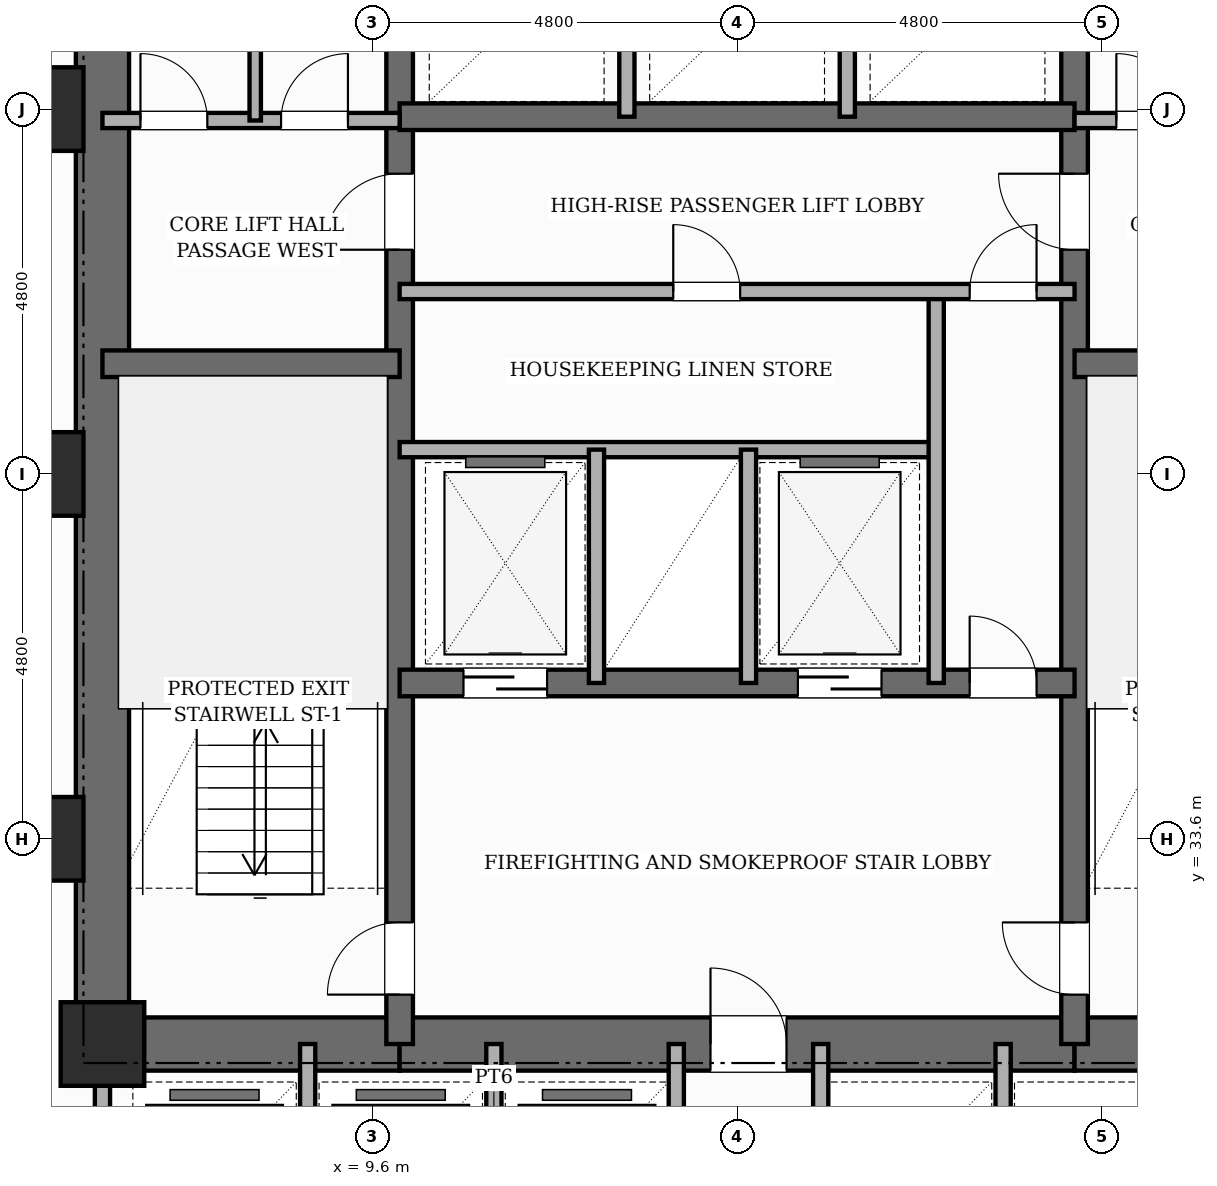
"""IFC4 building model, lengths in metres.
Left out: names, types, materials, properties, quantities, classifications, styles, units other than length and angle.
Written with IfcOpenShell. Run it as: python <this file> out.ifc"""

import sys

from ifc_helpers import new_model, si_unit, direction, frame, frame_2d, origin, origin_2d, place, context, subcontext, project, spatial, rectangle, extrude, element, fill, save


model = new_model("IFC4")
c1 = context("Model", 3, precision=1e-05, world=origin(), true_north=direction((0.0, 1.0)))
c2 = subcontext(c1, "Body", "Model", "MODEL_VIEW")
j1 = project(units=[si_unit("LENGTHUNIT", "METRE"), si_unit("PLANEANGLEUNIT", "RADIAN")], contexts=[c1])
p1 = place(None, origin())
s1 = spatial("IfcSite", under=j1, at=p1, CompositionType="ELEMENT")
p2 = place(p1, origin())
s2 = spatial("IfcBuilding", under=s1, at=p2, CompositionType="ELEMENT")
p3 = place(p2, frame((0.0, 0.0, 46.6)))
s3 = spatial("IfcBuildingStorey", under=s2, at=p3, CompositionType="ELEMENT", Elevation=46.6)
p4 = place(p3, frame((6.05, 30.55, 0.0), z_axis=(0.0, 0.0, 1.0), x_axis=(0.0, 1.0, 0.0)))
e1 = element("IfcWall", 1, at=p4, inside=s3, PredefinedType="SHEAR", context=c2, shape_type="SweptSolid", body=[
    extrude(rectangle(XDim=15.6, YDim=0.7, at=frame_2d((7.8, 0.0))), origin(), (0.0, 0.0, 1.0), 3.6),
])
p5 = place(p3, frame((6.05, 30.9, 0.0), z_axis=(0.0, 0.0, 1.0), x_axis=(1.0, 0.0, 0.0)))
e2 = element("IfcWall", 2, at=p5, inside=s3, PredefinedType="SHEAR", context=c2, shape_type="SweptSolid", body=[
    extrude(rectangle(XDim=3.91, YDim=0.7, at=frame_2d((1.955, 0.0))), origin(), (0.0, 0.0, 1.0), 3.6),
])
p6 = place(p3, frame((9.96, 30.9, 0.0), z_axis=(0.0, 0.0, 1.0), x_axis=(1.0, 0.0, 0.0)))
e3 = element("IfcWall", 3, at=p6, inside=s3, PredefinedType="SHEAR", context=c2, shape_type="SweptSolid", body=[
    extrude(rectangle(XDim=8.88, YDim=0.7, at=frame_2d((4.44, 0.0))), origin(), (0.0, 0.0, 1.0), 3.6),
])
p7 = place(p6, frame((4.09, 0.0, 0.0)))
e4 = element("IfcOpeningElement", 4, at=p7, cuts=e3, PredefinedType="OPENING", context=c2, shape_type="SweptSolid", body=[
    extrude(rectangle(XDim=1.0, YDim=2.15, at=frame_2d((0.5, 1.075))), frame((0.0, 0.36, 0.0), z_axis=(0.0, -1.0, 0.0), x_axis=(1.0, 0.0, 0.0)), (0.0, 0.0, 1.0), 0.72),
])
p8 = place(p3, frame((18.84, 30.9, 0.0), z_axis=(0.0, 0.0, 1.0), x_axis=(1.0, 0.0, 0.0)))
e5 = element("IfcWall", 5, at=p8, inside=s3, PredefinedType="SHEAR", context=c2, shape_type="SweptSolid", body=[
    extrude(rectangle(XDim=3.91, YDim=0.7, at=frame_2d((1.955, 0.0))), origin(), (0.0, 0.0, 1.0), 3.6),
])
p9 = place(p3, frame((9.96, 30.9, 0.0), z_axis=(0.0, 0.0, 1.0), x_axis=(0.0, 1.0, 0.0)))
e6 = element("IfcWall", 6, at=p9, inside=s3, PredefinedType="SHEAR", context=c2, shape_type="SweptSolid", body=[
    extrude(rectangle(XDim=14.9, YDim=0.35, at=frame_2d((7.45, 0.0))), origin(), (0.0, 0.0, 1.0), 3.6),
])
p10 = place(p9, frame((0.65, 0.0, 0.0)))
e7 = element("IfcOpeningElement", 7, at=p10, cuts=e6, PredefinedType="OPENING", context=c2, shape_type="SweptSolid", body=[
    extrude(rectangle(XDim=0.95, YDim=2.1, at=frame_2d((0.475, 1.05))), frame((0.0, 0.185, 0.0), z_axis=(0.0, -1.0, 0.0), x_axis=(1.0, 0.0, 0.0)), (0.0, 0.0, 1.0), 0.37),
])
p11 = place(p9, frame((10.45, 0.0, 0.0)))
e8 = element("IfcOpeningElement", 8, at=p11, cuts=e6, PredefinedType="OPENING", context=c2, shape_type="SweptSolid", body=[
    extrude(rectangle(XDim=1.0, YDim=2.15, at=frame_2d((0.5, 1.075))), frame((0.0, 0.185, 0.0), z_axis=(0.0, -1.0, 0.0), x_axis=(1.0, 0.0, 0.0)), (0.0, 0.0, 1.0), 0.37),
])
p12 = place(p3, frame((18.84, 30.9, 0.0), z_axis=(0.0, 0.0, 1.0), x_axis=(0.0, 1.0, 0.0)))
e9 = element("IfcWall", 9, at=p12, inside=s3, PredefinedType="SHEAR", context=c2, shape_type="SweptSolid", body=[
    extrude(rectangle(XDim=14.9, YDim=0.35, at=frame_2d((7.45, 0.0))), origin(), (0.0, 0.0, 1.0), 3.6),
])
p13 = place(p12, frame((0.65, 0.0, 0.0)))
e10 = element("IfcOpeningElement", 10, at=p13, cuts=e9, PredefinedType="OPENING", context=c2, shape_type="SweptSolid", body=[
    extrude(rectangle(XDim=0.95, YDim=2.1, at=frame_2d((0.475, 1.05))), frame((0.0, 0.185, 0.0), z_axis=(0.0, -1.0, 0.0), x_axis=(1.0, 0.0, 0.0)), (0.0, 0.0, 1.0), 0.37),
])
p14 = place(p12, frame((10.45, 0.0, 0.0)))
e11 = element("IfcOpeningElement", 11, at=p14, cuts=e9, PredefinedType="OPENING", context=c2, shape_type="SweptSolid", body=[
    extrude(rectangle(XDim=1.0, YDim=2.15, at=frame_2d((0.5, 1.075))), frame((0.0, 0.185, 0.0), z_axis=(0.0, -1.0, 0.0), x_axis=(1.0, 0.0, 0.0)), (0.0, 0.0, 1.0), 0.37),
])
for number, where, z_axis, x_axis in (
    (12, (6.05, 39.85, 0.0), (0.0, 0.0, 1.0), (1.0, 0.0, 0.0)),
    (13, (18.84, 39.85, 0.0), (0.0, 0.0, 1.0), (1.0, 0.0, 0.0)),
):
    element("IfcWall", number, at=place(p3, frame(where, z_axis=z_axis, x_axis=x_axis)), inside=s3, PredefinedType="SHEAR", context=c2, shape_type="SweptSolid", body=[
        extrude(rectangle(XDim=3.91, YDim=0.35, at=frame_2d((1.955, 0.0))), origin(), (0.0, 0.0, 1.0), 3.6),
    ])
p15 = place(p3, frame((9.96, 35.65, 0.0), z_axis=(0.0, 0.0, 1.0), x_axis=(1.0, 0.0, 0.0)))
e14 = element("IfcWall", 14, at=p15, inside=s3, PredefinedType="SHEAR", context=c2, shape_type="SweptSolid", body=[
    extrude(rectangle(XDim=8.88, YDim=0.35, at=frame_2d((4.44, 0.0))), origin(), (0.0, 0.0, 1.0), 3.6),
])
p16 = place(p15, frame((0.84, 0.0, 0.0)))
e15 = element("IfcOpeningElement", 15, at=p16, cuts=e14, PredefinedType="OPENING", context=c2, shape_type="SweptSolid", body=[
    extrude(rectangle(XDim=1.1, YDim=2.15, at=frame_2d((0.55, 1.075))), frame((0.0, 0.185, 0.0), z_axis=(0.0, -1.0, 0.0), x_axis=(1.0, 0.0, 0.0)), (0.0, 0.0, 1.0), 0.37),
])
p17 = place(p15, frame((5.24, 0.0, 0.0)))
e16 = element("IfcOpeningElement", 16, at=p17, cuts=e14, PredefinedType="OPENING", context=c2, shape_type="SweptSolid", body=[
    extrude(rectangle(XDim=1.1, YDim=2.15, at=frame_2d((0.55, 1.075))), frame((0.0, 0.185, 0.0), z_axis=(0.0, -1.0, 0.0), x_axis=(1.0, 0.0, 0.0)), (0.0, 0.0, 1.0), 0.37),
])
p18 = place(p15, frame((7.5, 0.0, 0.0)))
e17 = element("IfcOpeningElement", 17, at=p18, cuts=e14, PredefinedType="OPENING", context=c2, shape_type="SweptSolid", body=[
    extrude(rectangle(XDim=0.88, YDim=2.1, at=frame_2d((0.44, 1.05))), frame((0.0, 0.185, 0.0), z_axis=(0.0, -1.0, 0.0), x_axis=(1.0, 0.0, 0.0)), (0.0, 0.0, 1.0), 0.37),
])
p19 = place(p3, frame((9.96, 43.1, 0.0), z_axis=(0.0, 0.0, 1.0), x_axis=(1.0, 0.0, 0.0)))
e18 = element("IfcWall", 18, at=p19, inside=s3, PredefinedType="SHEAR", context=c2, shape_type="SweptSolid", body=[
    extrude(rectangle(XDim=8.88, YDim=0.35, at=frame_2d((4.44, 0.0))), origin(), (0.0, 0.0, 1.0), 3.6),
])
for number, where, z_axis, x_axis in (
    (19, (5.25, 33.6, 0.0), (0.0, 0.0, 1.0), (1.0, 0.0, 0.0)),
    (20, (5.25, 38.4, 0.0), (0.0, 0.0, 1.0), (1.0, 0.0, 0.0)),
    (21, (5.25, 43.2, 0.0), (0.0, 0.0, 1.0), (1.0, 0.0, 0.0)),
    (22, (6.05, 30.9, 0.0), (0.0, 0.0, 1.0), (1.0, 0.0, 0.0)),
):
    element("IfcColumn", number, at=place(p3, frame(where, z_axis=z_axis, x_axis=x_axis)), inside=s3, PredefinedType="COLUMN", context=c2, shape_type="SweptSolid", body=[
        extrude(rectangle(XDim=1.1, YDim=1.1, at=origin_2d()), origin(), (0.0, 0.0, 1.0), 3.6),
    ])
p20 = place(p3, frame((9.96, 38.72, 0.0), z_axis=(0.0, 0.0, 1.0), x_axis=(1.0, 0.0, 0.0)))
e23 = element("IfcWall", 23, at=p20, inside=s3, PredefinedType="POLYGONAL", context=c2, shape_type="SweptSolid", body=[
    extrude(rectangle(XDim=7.06, YDim=0.2, at=frame_2d((3.53, 0.0))), origin(), (0.0, 0.0, 1.0), 3.35),
])
for number, where, z_axis, x_axis in (
    (24, (12.55, 35.65, 0.0), (0.0, 0.0, 1.0), (0.0, 1.0, 0.0)),
    (25, (14.55, 35.65, 0.0), (0.0, 0.0, 1.0), (0.0, 1.0, 0.0)),
):
    element("IfcWall", number, at=place(p3, frame(where, z_axis=z_axis, x_axis=x_axis)), inside=s3, PredefinedType="POLYGONAL", context=c2, shape_type="SweptSolid", body=[
        extrude(rectangle(XDim=3.07, YDim=0.2, at=frame_2d((1.535, 0.0))), origin(), (0.0, 0.0, 1.0), 3.35),
    ])
p21 = place(p3, frame((17.02, 35.65, 0.0), z_axis=(0.0, 0.0, 1.0), x_axis=(0.0, 1.0, 0.0)))
e26 = element("IfcWall", 26, at=p21, inside=s3, PredefinedType="POLYGONAL", context=c2, shape_type="SweptSolid", body=[
    extrude(rectangle(XDim=5.15, YDim=0.2, at=frame_2d((2.575, 0.0))), origin(), (0.0, 0.0, 1.0), 3.35),
])
p22 = place(p3, frame((9.96, 40.8, 0.0), z_axis=(0.0, 0.0, 1.0), x_axis=(1.0, 0.0, 0.0)))
e27 = element("IfcWall", 27, at=p22, inside=s3, PredefinedType="POLYGONAL", context=c2, shape_type="SweptSolid", body=[
    extrude(rectangle(XDim=8.88, YDim=0.2, at=frame_2d((4.44, 0.0))), origin(), (0.0, 0.0, 1.0), 3.35),
])
p23 = place(p22, frame((7.5, 0.0, 0.0)))
e28 = element("IfcOpeningElement", 28, at=p23, cuts=e27, PredefinedType="OPENING", context=c2, shape_type="SweptSolid", body=[
    extrude(rectangle(XDim=0.88, YDim=2.1, at=frame_2d((0.44, 1.05))), frame((0.0, 0.11, 0.0), z_axis=(0.0, -1.0, 0.0), x_axis=(1.0, 0.0, 0.0)), (0.0, 0.0, 1.0), 0.22),
])
p24 = place(p22, frame((3.6, 0.0, 0.0)))
e29 = element("IfcOpeningElement", 29, at=p24, cuts=e27, PredefinedType="OPENING", context=c2, shape_type="SweptSolid", body=[
    extrude(rectangle(XDim=0.88, YDim=2.1, at=frame_2d((0.44, 1.05))), frame((0.0, 0.11, 0.0), z_axis=(0.0, -1.0, 0.0), x_axis=(1.0, 0.0, 0.0)), (0.0, 0.0, 1.0), 0.22),
])
p25 = place(p3, frame((18.84, 43.05, 0.0), z_axis=(0.0, 0.0, 1.0), x_axis=(1.0, 0.0, 0.0)))
e30 = element("IfcWall", 30, at=p25, inside=s3, PredefinedType="POLYGONAL", context=c2, shape_type="SweptSolid", body=[
    extrude(rectangle(XDim=3.91, YDim=0.2, at=frame_2d((1.955, 0.0))), origin(), (0.0, 0.0, 1.0), 2.53),
])
p26 = place(p25, frame((0.55, 0.0, 0.0)))
e31 = element("IfcOpeningElement", 31, at=p26, cuts=e30, PredefinedType="OPENING", context=c2, shape_type="SweptSolid", body=[
    extrude(rectangle(XDim=0.88, YDim=2.1, at=frame_2d((0.44, 1.05))), frame((0.0, 0.11, 0.0), z_axis=(0.0, -1.0, 0.0), x_axis=(1.0, 0.0, 0.0)), (0.0, 0.0, 1.0), 0.22),
])
p27 = place(p25, frame((2.25, 0.0, 0.0)))
e32 = element("IfcOpeningElement", 32, at=p27, cuts=e30, PredefinedType="OPENING", context=c2, shape_type="SweptSolid", body=[
    extrude(rectangle(XDim=0.86, YDim=2.1, at=frame_2d((0.43, 1.05))), frame((0.0, 0.11, 0.0), z_axis=(0.0, -1.0, 0.0), x_axis=(1.0, 0.0, 0.0)), (0.0, 0.0, 1.0), 0.22),
])
p28 = place(p3, frame((6.05, 43.05, 0.0), z_axis=(0.0, 0.0, 1.0), x_axis=(1.0, 0.0, 0.0)))
e33 = element("IfcWall", 33, at=p28, inside=s3, PredefinedType="POLYGONAL", context=c2, shape_type="SweptSolid", body=[
    extrude(rectangle(XDim=3.91, YDim=0.2, at=frame_2d((1.955, 0.0))), origin(), (0.0, 0.0, 1.0), 2.53),
])
p29 = place(p28, frame((0.5, 0.0, 0.0)))
e34 = element("IfcOpeningElement", 34, at=p29, cuts=e33, PredefinedType="OPENING", context=c2, shape_type="SweptSolid", body=[
    extrude(rectangle(XDim=0.88, YDim=2.1, at=frame_2d((0.44, 1.05))), frame((0.0, 0.11, 0.0), z_axis=(0.0, -1.0, 0.0), x_axis=(1.0, 0.0, 0.0)), (0.0, 0.0, 1.0), 0.22),
])
p30 = place(p28, frame((2.35, 0.0, 0.0)))
e35 = element("IfcOpeningElement", 35, at=p30, cuts=e33, PredefinedType="OPENING", context=c2, shape_type="SweptSolid", body=[
    extrude(rectangle(XDim=0.88, YDim=2.1, at=frame_2d((0.44, 1.05))), frame((0.0, 0.11, 0.0), z_axis=(0.0, -1.0, 0.0), x_axis=(1.0, 0.0, 0.0)), (0.0, 0.0, 1.0), 0.22),
])
for number, where, z_axis, x_axis in (
    (36, (12.95, 43.1, 0.0), (0.0, 0.0, 1.0), (0.0, 1.0, 0.0)),
    (37, (15.85, 43.1, 0.0), (0.0, 0.0, 1.0), (0.0, 1.0, 0.0)),
):
    element("IfcWall", number, at=place(p3, frame(where, z_axis=z_axis, x_axis=x_axis)), inside=s3, PredefinedType="POLYGONAL", context=c2, shape_type="SweptSolid", body=[
        extrude(rectangle(XDim=2.55, YDim=0.2, at=frame_2d((1.275, 0.0))), origin(), (0.0, 0.0, 1.0), 3.35),
    ])
p31 = place(p3, frame((8.06, 43.05, 0.0), z_axis=(0.0, 0.0, 1.0), x_axis=(0.0, 1.0, 0.0)))
e38 = element("IfcWall", 38, at=p31, inside=s3, PredefinedType="PARTITIONING", context=c2, shape_type="SweptSolid", body=[
    extrude(rectangle(XDim=2.6, YDim=0.15, at=frame_2d((1.3, 0.0))), origin(), (0.0, 0.0, 1.0), 3.35),
])
p32 = place(p3, frame((6.05, 27.9, 0.0), z_axis=(0.0, 0.0, 1.0), x_axis=(0.0, 1.0, 0.0)))
e39 = element("IfcWall", 39, at=p32, inside=s3, PredefinedType="POLYGONAL", context=c2, shape_type="SweptSolid", body=[
    extrude(rectangle(XDim=3.0, YDim=0.2, at=frame_2d((1.5, 0.0))), origin(), (0.0, 0.0, 1.0), 3.35),
])
for number, where, z_axis, x_axis in (
    (40, (13.6, 28.0, 0.0), (0.0, 0.0, 1.0), (0.0, 1.0, 0.0)),
    (41, (15.5, 28.0, 0.0), (0.0, 0.0, 1.0), (0.0, 1.0, 0.0)),
    (42, (8.75, 28.0, 0.0), (0.0, 0.0, 1.0), (0.0, 1.0, 0.0)),
    (43, (11.2, 28.0, 0.0), (0.0, 0.0, 1.0), (0.0, 1.0, 0.0)),
    (44, (17.9, 28.0, 0.0), (0.0, 0.0, 1.0), (0.0, 1.0, 0.0)),
):
    element("IfcWall", number, at=place(p3, frame(where, z_axis=z_axis, x_axis=x_axis)), inside=s3, PredefinedType="POLYGONAL", context=c2, shape_type="SweptSolid", body=[
        extrude(rectangle(XDim=2.9, YDim=0.2, at=frame_2d((1.45, 0.0))), origin(), (0.0, 0.0, 1.0), 3.35),
    ])
p33 = place(p10, origin())
e45 = element("IfcDoor", 45, at=p33, inside=s3, OperationType="SINGLE_SWING_LEFT", PredefinedType="DOOR", context=c2, shape_type="SweptSolid", body=[
    extrude(rectangle(XDim=0.95, YDim=2.1, at=frame_2d((0.475, 1.05))), frame((0.0, 0.025, 0.0), z_axis=(0.0, -1.0, 0.0), x_axis=(1.0, 0.0, 0.0)), (0.0, 0.0, 1.0), 0.05),
])
fill(e7, e45)
p34 = place(p13, origin())
e46 = element("IfcDoor", 46, at=p34, inside=s3, OperationType="SINGLE_SWING_RIGHT", PredefinedType="DOOR", context=c2, shape_type="SweptSolid", body=[
    extrude(rectangle(XDim=0.95, YDim=2.1, at=frame_2d((0.475, 1.05))), frame((0.0, 0.025, 0.0), z_axis=(0.0, -1.0, 0.0), x_axis=(1.0, 0.0, 0.0)), (0.0, 0.0, 1.0), 0.05),
])
fill(e10, e46)
p35 = place(p7, origin())
e47 = element("IfcDoor", 47, at=p35, inside=s3, OperationType="SINGLE_SWING_LEFT", PredefinedType="DOOR", context=c2, shape_type="SweptSolid", body=[
    extrude(rectangle(XDim=1.0, YDim=2.15, at=frame_2d((0.5, 1.075))), frame((0.0, 0.025, 0.0), z_axis=(0.0, -1.0, 0.0), x_axis=(1.0, 0.0, 0.0)), (0.0, 0.0, 1.0), 0.05),
])
fill(e4, e47)
p36 = place(p16, origin())
e48 = element("IfcDoor", 48, at=p36, inside=s3, OperationType="SLIDING_TO_LEFT", PredefinedType="DOOR", context=c2, shape_type="SweptSolid", body=[
    extrude(rectangle(XDim=1.1, YDim=2.15, at=frame_2d((0.55, 1.075))), frame((0.0, 0.025, 0.0), z_axis=(0.0, -1.0, 0.0), x_axis=(1.0, 0.0, 0.0)), (0.0, 0.0, 1.0), 0.05),
])
fill(e15, e48)
p37 = place(p17, origin())
e49 = element("IfcDoor", 49, at=p37, inside=s3, OperationType="SLIDING_TO_RIGHT", PredefinedType="DOOR", context=c2, shape_type="SweptSolid", body=[
    extrude(rectangle(XDim=1.1, YDim=2.15, at=frame_2d((0.55, 1.075))), frame((0.0, 0.025, 0.0), z_axis=(0.0, -1.0, 0.0), x_axis=(1.0, 0.0, 0.0)), (0.0, 0.0, 1.0), 0.05),
])
fill(e16, e49)
p38 = place(p18, origin())
e50 = element("IfcDoor", 50, at=p38, inside=s3, OperationType="SINGLE_SWING_LEFT", PredefinedType="DOOR", context=c2, shape_type="SweptSolid", body=[
    extrude(rectangle(XDim=0.88, YDim=2.1, at=frame_2d((0.44, 1.05))), frame((0.0, 0.025, 0.0), z_axis=(0.0, -1.0, 0.0), x_axis=(1.0, 0.0, 0.0)), (0.0, 0.0, 1.0), 0.05),
])
fill(e17, e50)
p39 = place(p23, origin())
e51 = element("IfcDoor", 51, at=p39, inside=s3, OperationType="SINGLE_SWING_RIGHT", PredefinedType="DOOR", context=c2, shape_type="SweptSolid", body=[
    extrude(rectangle(XDim=0.88, YDim=2.1, at=frame_2d((0.44, 1.05))), frame((0.0, 0.025, 0.0), z_axis=(0.0, -1.0, 0.0), x_axis=(1.0, 0.0, 0.0)), (0.0, 0.0, 1.0), 0.05),
])
fill(e28, e51)
p40 = place(p11, origin())
e52 = element("IfcDoor", 52, at=p40, inside=s3, OperationType="SINGLE_SWING_LEFT", PredefinedType="DOOR", context=c2, shape_type="SweptSolid", body=[
    extrude(rectangle(XDim=1.0, YDim=2.15, at=frame_2d((0.5, 1.075))), frame((0.0, 0.025, 0.0), z_axis=(0.0, -1.0, 0.0), x_axis=(1.0, 0.0, 0.0)), (0.0, 0.0, 1.0), 0.05),
])
fill(e8, e52)
p41 = place(p14, origin())
e53 = element("IfcDoor", 53, at=p41, inside=s3, OperationType="SINGLE_SWING_RIGHT", PredefinedType="DOOR", context=c2, shape_type="SweptSolid", body=[
    extrude(rectangle(XDim=1.0, YDim=2.15, at=frame_2d((0.5, 1.075))), frame((0.0, 0.025, 0.0), z_axis=(0.0, -1.0, 0.0), x_axis=(1.0, 0.0, 0.0)), (0.0, 0.0, 1.0), 0.05),
])
fill(e11, e53)
p42 = place(p29, origin())
e54 = element("IfcDoor", 54, at=p42, inside=s3, OperationType="SINGLE_SWING_LEFT", PredefinedType="DOOR", context=c2, shape_type="SweptSolid", body=[
    extrude(rectangle(XDim=0.88, YDim=2.1, at=frame_2d((0.44, 1.05))), frame((0.0, 0.025, 0.0), z_axis=(0.0, -1.0, 0.0), x_axis=(1.0, 0.0, 0.0)), (0.0, 0.0, 1.0), 0.05),
])
fill(e34, e54)
p43 = place(p30, origin())
e55 = element("IfcDoor", 55, at=p43, inside=s3, OperationType="SINGLE_SWING_RIGHT", PredefinedType="DOOR", context=c2, shape_type="SweptSolid", body=[
    extrude(rectangle(XDim=0.88, YDim=2.1, at=frame_2d((0.44, 1.05))), frame((0.0, 0.025, 0.0), z_axis=(0.0, -1.0, 0.0), x_axis=(1.0, 0.0, 0.0)), (0.0, 0.0, 1.0), 0.05),
])
fill(e35, e55)
p44 = place(p24, origin())
e56 = element("IfcDoor", 56, at=p44, inside=s3, OperationType="SINGLE_SWING_LEFT", PredefinedType="DOOR", context=c2, shape_type="SweptSolid", body=[
    extrude(rectangle(XDim=0.88, YDim=2.1, at=frame_2d((0.44, 1.05))), frame((0.0, 0.025, 0.0), z_axis=(0.0, -1.0, 0.0), x_axis=(1.0, 0.0, 0.0)), (0.0, 0.0, 1.0), 0.05),
])
fill(e29, e56)
p45 = place(p26, origin())
e57 = element("IfcDoor", 57, at=p45, inside=s3, OperationType="SINGLE_SWING_LEFT", PredefinedType="DOOR", context=c2, shape_type="SweptSolid", body=[
    extrude(rectangle(XDim=0.88, YDim=2.1, at=frame_2d((0.44, 1.05))), frame((0.0, 0.025, 0.0), z_axis=(0.0, -1.0, 0.0), x_axis=(1.0, 0.0, 0.0)), (0.0, 0.0, 1.0), 0.05),
])
fill(e31, e57)
save(model, sys.argv[1])
